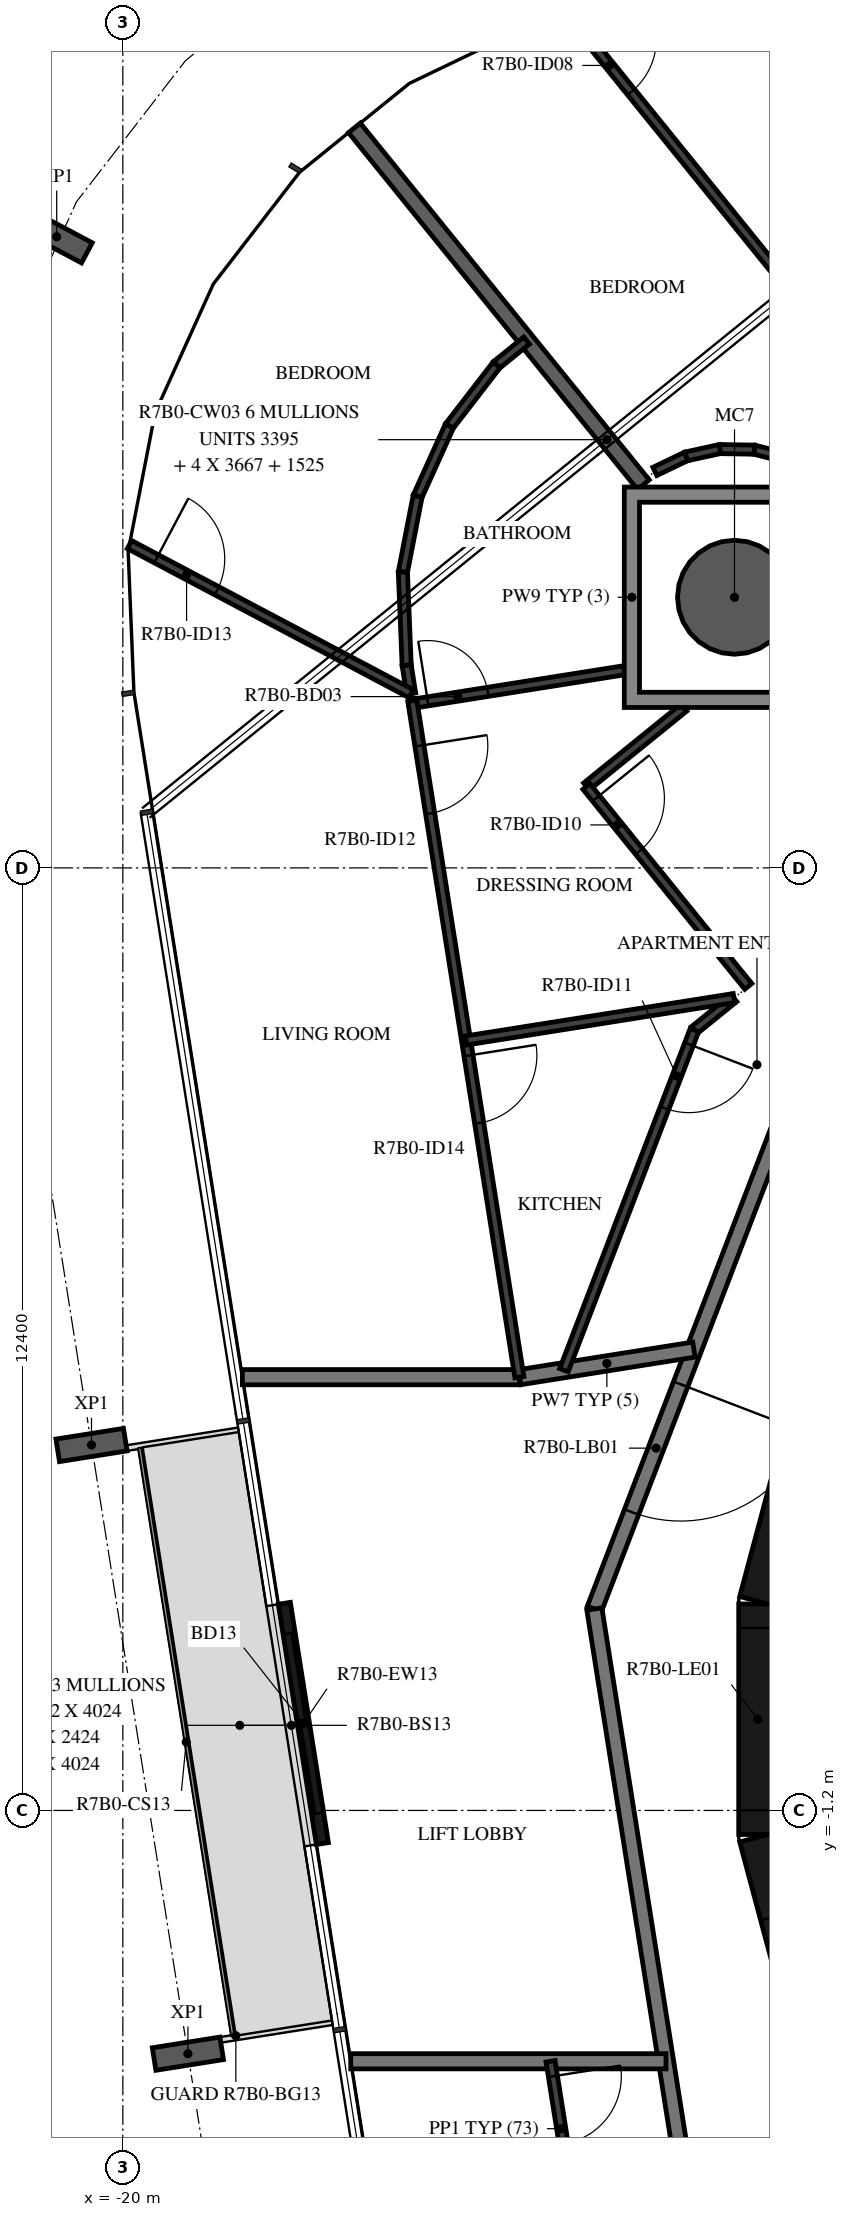
"""IFC4 building model, lengths in metres.
Left out: names, types, materials, properties, quantities, classifications, styles, units other than length and angle.
Written with IfcOpenShell. Run it as: python <this file> out.ifc"""

import sys

from ifc_helpers import new_model, si_unit, direction, frame, frame_2d, origin, origin_2d, place, context, subcontext, project, spatial, polyline, rectangle, hollow_circle, i_section, outline, extrude, element, fill, save


model = new_model("IFC4")
c1 = context("Model", 3, precision=1e-05, world=origin(), true_north=direction((0.0, 1.0)))
c2 = subcontext(c1, "Body", "Model", "MODEL_VIEW")
j1 = project(units=[si_unit("LENGTHUNIT", "METRE"), si_unit("PLANEANGLEUNIT", "RADIAN")], contexts=[c1])
p1 = place(None, origin())
s1 = spatial("IfcSite", under=j1, at=p1, CompositionType="ELEMENT")
p2 = place(p1, origin())
s2 = spatial("IfcBuilding", under=s1, at=p2, CompositionType="ELEMENT")
p3 = place(p2, frame((0.0, 0.0, 277.4)))
s3 = spatial("IfcBuildingStorey", under=s2, at=p3, CompositionType="ELEMENT", Elevation=277.4)
p4 = place(p3, frame((-11.953, 14.76, -0.38), z_axis=(0.0, 0.0, 1.0), x_axis=(1.0, 0.0, 0.0)))
e1 = element("IfcColumn", 1, at=p4, inside=s3, PredefinedType="COLUMN", context=c2, shape_type="SweptSolid", body=[
    extrude(hollow_circle(Radius=0.75, WallThickness=0.035, at=origin_2d()), origin(), (0.0, 0.0, 1.0), 3.5),
])
for number, where, z_axis, x_axis in (
    (2, (-20.87, 19.503, -0.38), (0.0, 0.0, 1.0), (0.47, 0.883, 0.0)),
    (3, (-20.412, 3.608, -0.38), (0.0, 0.0, 1.0), (-0.156, 0.988, 0.0)),
    (4, (-19.144, -4.4, -0.38), (0.0, 0.0, 1.0), (-0.156, 0.988, 0.0)),
):
    element("IfcColumn", number, at=place(p3, frame(where, z_axis=z_axis, x_axis=x_axis)), inside=s3, PredefinedType="COLUMN", context=c2, shape_type="SweptSolid", body=[
        extrude(i_section(OverallWidth=0.3, OverallDepth=0.9, WebThickness=0.019, FlangeThickness=0.035, FilletRadius=0.03, at=origin_2d()), origin(), (0.0, 0.0, 1.0), 3.5),
    ])
p5 = place(p3, frame((-17.875, 1.525, 0.0), z_axis=(0.0, 0.0, 1.0), x_axis=(0.156413134305, -0.987691718816, 0.0)))
e5 = element("IfcWall", 5, at=p5, inside=s3, PredefinedType="STANDARD", context=c2, shape_type="SweptSolid", body=[
    extrude(rectangle(XDim=3.2, YDim=0.16, at=frame_2d((1.6, 0.0))), origin(), (0.0, 0.0, 1.0), 3.12),
])
p6 = place(p5, frame((0.4, 0.0, 0.0)))
e6 = element("IfcOpeningElement", 6, at=p6, cuts=e5, PredefinedType="OPENING", context=c2, shape_type="SweptSolid", body=[
    extrude(rectangle(XDim=2.4, YDim=2.4, at=frame_2d((1.2, 1.2))), frame((0.0, 0.09, 0.0), z_axis=(0.0, -1.0, 0.0), x_axis=(1.0, 0.0, 0.0)), (0.0, 0.0, 1.0), 0.18),
])
p7 = place(p3, frame((-10.858, 4.479, 0.0), z_axis=(0.0, 0.0, 1.0), x_axis=(-0.258734743916, -0.965948410781, 0.0)))
e7 = element("IfcWall", 7, at=p7, inside=s3, PredefinedType="SHEAR", context=c2, shape_type="SweptSolid", body=[
    extrude(rectangle(XDim=3.033, YDim=0.5, at=frame_2d((1.516, 0.0))), origin(), (0.0, 0.0, 1.0), 3.12),
])
p8 = place(p3, frame((-11.647, 1.516, 0.0), z_axis=(0.0, 0.0, 1.0), x_axis=(0.0, -1.0, 0.0)))
e8 = element("IfcWall", 8, at=p8, inside=s3, PredefinedType="SHEAR", context=c2, shape_type="SweptSolid", body=[
    extrude(rectangle(XDim=3.033, YDim=0.5, at=frame_2d((1.516, 0.0))), origin(), (0.0, 0.0, 1.0), 3.12),
])
p9 = place(p8, frame((0.316, 0.0, 0.0)))
e9 = element("IfcOpeningElement", 9, at=p9, cuts=e8, PredefinedType="OPENING", context=c2, shape_type="SweptSolid", body=[
    extrude(rectangle(XDim=2.4, YDim=2.1, at=frame_2d((1.2, 1.05))), frame((0.0, 0.26, 0.0), z_axis=(0.0, -1.0, 0.0), x_axis=(1.0, 0.0, 0.0)), (0.0, 0.0, 1.0), 0.52),
])
p10 = place(p3, frame((-11.643, -1.55, 0.0), z_axis=(0.0, 0.0, 1.0), x_axis=(0.258734743916, -0.965948410781, 0.0)))
e10 = element("IfcWall", 10, at=p10, inside=s3, PredefinedType="SHEAR", context=c2, shape_type="SweptSolid", body=[
    extrude(rectangle(XDim=3.033, YDim=0.5, at=frame_2d((1.516, 0.0))), origin(), (0.0, 0.0, 1.0), 3.12),
])
p11 = place(p10, frame((1.066, 0.0, 0.0)))
e11 = element("IfcOpeningElement", 11, at=p11, cuts=e10, PredefinedType="OPENING", context=c2, shape_type="SweptSolid", body=[
    extrude(rectangle(XDim=0.9, YDim=2.1, at=frame_2d((0.45, 1.05))), frame((0.0, 0.26, 0.0), z_axis=(0.0, -1.0, 0.0), x_axis=(1.0, 0.0, 0.0)), (0.0, 0.0, 1.0), 0.52),
])
p12 = place(p3, frame((-11.223, 8.154, 0.0), z_axis=(0.0, 0.0, 1.0), x_axis=(-0.358341090983, -0.93359073609, 0.0)))
e12 = element("IfcWall", 12, at=p12, inside=s3, PredefinedType="STANDARD", context=c2, shape_type="SweptSolid", body=[
    extrude(rectangle(XDim=7.181, YDim=0.2, at=frame_2d((3.59, 0.0))), origin(), (0.0, 0.0, 1.0), 3.12),
])
p13 = place(p12, frame((4.014, 0.0, 0.0)))
e13 = element("IfcOpeningElement", 13, at=p13, cuts=e12, PredefinedType="OPENING", context=c2, shape_type="SweptSolid", body=[
    extrude(rectangle(XDim=1.8, YDim=2.1, at=frame_2d((0.9, 1.05))), frame((0.0, 0.11, 0.0), z_axis=(0.0, -1.0, 0.0), x_axis=(1.0, 0.0, 0.0)), (0.0, 0.0, 1.0), 0.22),
])
p14 = place(p3, frame((-13.797, 1.45, 0.0), z_axis=(0.0, 0.0, 1.0), x_axis=(0.156421704315, -0.987690361611, 0.0)))
e14 = element("IfcWall", 14, at=p14, inside=s3, PredefinedType="STANDARD", context=c2, shape_type="SweptSolid", body=[
    extrude(rectangle(XDim=7.181, YDim=0.2, at=frame_2d((3.591, 0.0))), origin(), (0.0, 0.0, 1.0), 3.12),
])
p15 = place(p3, frame((-12.487, 4.863, 0.0), z_axis=(0.0, 0.0, 1.0), x_axis=(-0.98769031179, -0.156422018898, 0.0)))
e15 = element("IfcWall", 15, at=p15, inside=s3, PredefinedType="STANDARD", context=c2, shape_type="SweptSolid", body=[
    extrude(rectangle(XDim=2.319, YDim=0.2, at=frame_2d((1.16, 0.0))), origin(), (0.0, 0.0, 1.0), 3.12),
])
p16 = place(p3, frame((-14.783, 4.5, 0.0), z_axis=(0.0, 0.0, 1.0), x_axis=(-1.0, 0.0, 0.0)))
e16 = element("IfcWall", 16, at=p16, inside=s3, PredefinedType="STANDARD", context=c2, shape_type="SweptSolid", body=[
    extrude(rectangle(XDim=3.645, YDim=0.2, at=frame_2d((1.822, 0.0))), origin(), (0.0, 0.0, 1.0), 3.12),
])
p17 = place(p3, frame((-17.002, -4.5, 0.0), z_axis=(0.0, 0.0, 1.0), x_axis=(1.0, 0.0, 0.0)))
e17 = element("IfcWall", 17, at=p17, inside=s3, PredefinedType="STANDARD", context=c2, shape_type="SweptSolid", body=[
    extrude(rectangle(XDim=4.148, YDim=0.2, at=frame_2d((2.074, 0.0))), origin(), (0.0, 0.0, 1.0), 3.12),
])
p18 = place(p3, frame((-16.953, 20.936, 0.0), z_axis=(0.0, 0.0, 1.0), x_axis=(0.629347053134, -0.77712437017, 0.0)))
e18 = element("IfcWall", 18, at=p18, inside=s3, PredefinedType="STANDARD", context=c2, shape_type="SweptSolid", body=[
    extrude(rectangle(XDim=6.04, YDim=0.2, at=frame_2d((3.02, 0.0))), origin(), (0.0, 0.0, 1.0), 3.12),
])
p19 = place(p3, frame((-14.132, 22.418, 0.0), z_axis=(0.0, 0.0, 1.0), x_axis=(0.629309172704, -0.77715504576, 0.0)))
e19 = element("IfcWall", 19, at=p19, inside=s3, PredefinedType="PARTITIONING", context=c2, shape_type="SweptSolid", body=[
    extrude(rectangle(XDim=8.736, YDim=0.12, at=frame_2d((4.368, 0.0))), origin(), (0.0, 0.0, 1.0), 3.12),
])
p20 = place(p19, frame((0.4, 0.0, 0.0)))
e20 = element("IfcOpeningElement", 20, at=p20, cuts=e19, PredefinedType="OPENING", context=c2, shape_type="SweptSolid", body=[
    extrude(rectangle(XDim=0.9, YDim=2.1, at=frame_2d((0.45, 1.05))), frame((0.0, 0.07, 0.0), z_axis=(0.0, -1.0, 0.0), x_axis=(1.0, 0.0, 0.0)), (0.0, 0.0, 1.0), 0.14),
])
p21 = place(p3, frame((-10.91, 16.502, 0.0), z_axis=(0.0, 0.0, 1.0), x_axis=(-0.96886520615, 0.247588796823, 0.0)))
e21 = element("IfcWall", 21, at=p21, inside=s3, PredefinedType="PARTITIONING", context=c2, shape_type="SweptSolid", body=[
    extrude(rectangle(XDim=0.807, YDim=0.12, at=frame_2d((0.403, 0.0))), origin(), (0.0, 0.0, 1.0), 3.12),
])
p22 = place(p3, frame((-11.691, 16.702, 0.0), z_axis=(0.0, 0.0, 1.0), x_axis=(-0.999843155249, 0.017710587291, 0.0)))
e22 = element("IfcWall", 22, at=p22, inside=s3, PredefinedType="PARTITIONING", context=c2, shape_type="SweptSolid", body=[
    extrude(rectangle(XDim=0.455, YDim=0.12, at=frame_2d((0.228, 0.0))), origin(), (0.0, 0.0, 1.0), 3.12),
])
p23 = place(p3, frame((-12.146, 16.71, 0.0), z_axis=(0.0, 0.0, 1.0), x_axis=(-0.976826470165, -0.21403281801, 0.0)))
e23 = element("IfcWall", 23, at=p23, inside=s3, PredefinedType="PARTITIONING", context=c2, shape_type="SweptSolid", body=[
    extrude(rectangle(XDim=0.455, YDim=0.12, at=frame_2d((0.228, 0.0))), origin(), (0.0, 0.0, 1.0), 3.12),
])
p24 = place(p3, frame((-12.591, 16.613, 0.0), z_axis=(0.0, 0.0, 1.0), x_axis=(-0.901405666701, -0.432975546699, 0.0)))
e24 = element("IfcWall", 24, at=p24, inside=s3, PredefinedType="PARTITIONING", context=c2, shape_type="SweptSolid", body=[
    extrude(rectangle(XDim=0.455, YDim=0.12, at=frame_2d((0.227, 0.0))), origin(), (0.0, 0.0, 1.0), 3.12),
])
p25 = place(p3, frame((-12.616, 13.311, 0.0), z_axis=(0.0, 0.0, 1.0), x_axis=(-0.7771657422, -0.629295963082, 0.0)))
e25 = element("IfcWall", 25, at=p25, inside=s3, PredefinedType="PARTITIONING", context=c2, shape_type="SweptSolid", body=[
    extrude(rectangle(XDim=1.653, YDim=0.12, at=frame_2d((0.826, 0.0))), origin(), (0.0, 0.0, 1.0), 3.12),
])
p26 = place(p3, frame((-13.901, 12.271, 0.0), z_axis=(0.0, 0.0, 1.0), x_axis=(0.62932066967, -0.777145735835, 0.0)))
e26 = element("IfcWall", 26, at=p26, inside=s3, PredefinedType="PARTITIONING", context=c2, shape_type="SweptSolid", body=[
    extrude(rectangle(XDim=3.384, YDim=0.12, at=frame_2d((1.692, 0.0))), origin(), (0.0, 0.0, 1.0), 3.12),
])
p27 = place(p26, frame((0.2, 0.0, 0.0)))
e27 = element("IfcOpeningElement", 27, at=p27, cuts=e26, PredefinedType="OPENING", context=c2, shape_type="SweptSolid", body=[
    extrude(rectangle(XDim=0.9, YDim=2.1, at=frame_2d((0.45, 1.05))), frame((0.0, 0.07, 0.0), z_axis=(0.0, -1.0, 0.0), x_axis=(1.0, 0.0, 0.0)), (0.0, 0.0, 1.0), 0.14),
])
p28 = place(p3, frame((-11.96, 9.487, 0.0), z_axis=(0.0, 0.0, 1.0), x_axis=(-0.777219341678, -0.62922976322, 0.0)))
e28 = element("IfcWall", 28, at=p28, inside=s3, PredefinedType="PARTITIONING", context=c2, shape_type="SweptSolid", body=[
    extrude(rectangle(XDim=0.668, YDim=0.12, at=frame_2d((0.334, 0.0))), origin(), (0.0, 0.0, 1.0), 3.12),
])
p29 = place(p3, frame((-12.479, 9.067, 0.0), z_axis=(0.0, 0.0, 1.0), x_axis=(-0.358402229057, -0.933567267104, 0.0)))
e29 = element("IfcWall", 29, at=p29, inside=s3, PredefinedType="PARTITIONING", context=c2, shape_type="SweptSolid", body=[
    extrude(rectangle(XDim=4.793, YDim=0.12, at=frame_2d((2.397, 0.0))), origin(), (0.0, 0.0, 1.0), 3.12),
])
p30 = place(p29, frame((0.2, 0.0, 0.0)))
e30 = element("IfcOpeningElement", 30, at=p30, cuts=e29, PredefinedType="OPENING", context=c2, shape_type="SweptSolid", body=[
    extrude(rectangle(XDim=0.9, YDim=2.1, at=frame_2d((0.45, 1.05))), frame((0.0, 0.07, 0.0), z_axis=(0.0, -1.0, 0.0), x_axis=(1.0, 0.0, 0.0)), (0.0, 0.0, 1.0), 0.14),
])
p31 = place(p3, frame((-14.688, 18.138, 0.0), z_axis=(0.0, 0.0, 1.0), x_axis=(-0.777009819755, -0.629488474879, 0.0)))
e31 = element("IfcWall", 31, at=p31, inside=s3, PredefinedType="PARTITIONING", context=c2, shape_type="SweptSolid", body=[
    extrude(rectangle(XDim=0.508, YDim=0.12, at=frame_2d((0.254, 0.0))), origin(), (0.0, 0.0, 1.0), 3.12),
])
p32 = place(p3, frame((-15.083, 17.818, 0.0), z_axis=(0.0, 0.0, 1.0), x_axis=(-0.611091802574, -0.791559731686, 0.0)))
e32 = element("IfcWall", 32, at=p32, inside=s3, PredefinedType="PARTITIONING", context=c2, shape_type="SweptSolid", body=[
    extrude(rectangle(XDim=1.016, YDim=0.12, at=frame_2d((0.508, 0.0))), origin(), (0.0, 0.0, 1.0), 3.12),
])
p33 = place(p3, frame((-15.703, 17.014, 0.0), z_axis=(0.0, 0.0, 1.0), x_axis=(-0.411973085874, -0.911196014322, 0.0)))
e33 = element("IfcWall", 33, at=p33, inside=s3, PredefinedType="PARTITIONING", context=c2, shape_type="SweptSolid", body=[
    extrude(rectangle(XDim=1.016, YDim=0.12, at=frame_2d((0.508, 0.0))), origin(), (0.0, 0.0, 1.0), 3.12),
])
p34 = place(p3, frame((-16.122, 16.088, 0.0), z_axis=(0.0, 0.0, 1.0), x_axis=(-0.191030445301, -0.981584112019, 0.0)))
e34 = element("IfcWall", 34, at=p34, inside=s3, PredefinedType="PARTITIONING", context=c2, shape_type="SweptSolid", body=[
    extrude(rectangle(XDim=1.016, YDim=0.12, at=frame_2d((0.508, 0.0))), origin(), (0.0, 0.0, 1.0), 3.12),
])
p35 = place(p3, frame((-16.316, 15.091, 0.0), z_axis=(0.0, 0.0, 1.0), x_axis=(0.040786423131, -0.999167887639, 0.0)))
e35 = element("IfcWall", 35, at=p35, inside=s3, PredefinedType="PARTITIONING", context=c2, shape_type="SweptSolid", body=[
    extrude(rectangle(XDim=1.227, YDim=0.12, at=frame_2d((0.614, 0.0))), origin(), (0.0, 0.0, 1.0), 3.12),
])
p36 = place(p3, frame((-16.266, 13.865, 0.0), z_axis=(0.0, 0.0, 1.0), x_axis=(0.156757556272, -0.987637113798, 0.0)))
e36 = element("IfcWall", 36, at=p36, inside=s3, PredefinedType="PARTITIONING", context=c2, shape_type="SweptSolid", body=[
    extrude(rectangle(XDim=0.378, YDim=0.12, at=frame_2d((0.189, 0.0))), origin(), (0.0, 0.0, 1.0), 3.12),
])
p37 = place(p3, frame((-16.186, 13.359, 0.0), z_axis=(0.0, 0.0, 1.0), x_axis=(0.987680631298, 0.156483131865, 0.0)))
e37 = element("IfcWall", 37, at=p37, inside=s3, PredefinedType="PARTITIONING", context=c2, shape_type="SweptSolid", body=[
    extrude(rectangle(XDim=2.818, YDim=0.12, at=frame_2d((1.409, 0.0))), origin(), (0.0, 0.0, 1.0), 3.12),
])
p38 = place(p37, frame((0.2, 0.0, 0.0)))
e38 = element("IfcOpeningElement", 38, at=p38, cuts=e37, PredefinedType="OPENING", context=c2, shape_type="SweptSolid", body=[
    extrude(rectangle(XDim=0.8, YDim=2.1, at=frame_2d((0.4, 1.05))), frame((0.0, 0.07, 0.0), z_axis=(0.0, -1.0, 0.0), x_axis=(1.0, 0.0, 0.0)), (0.0, 0.0, 1.0), 0.14),
])
p39 = place(p3, frame((-19.913, 15.454, 0.0), z_axis=(0.0, 0.0, 1.0), x_axis=(0.883751094582, -0.467957266024, 0.0)))
e39 = element("IfcWall", 39, at=p39, inside=s3, PredefinedType="PARTITIONING", context=c2, shape_type="SweptSolid", body=[
    extrude(rectangle(XDim=4.194, YDim=0.12, at=frame_2d((2.097, 0.0))), origin(), (0.0, 0.0, 1.0), 3.12),
])
p40 = place(p39, frame((0.4, 0.0, 0.0)))
e40 = element("IfcOpeningElement", 40, at=p40, cuts=e39, PredefinedType="OPENING", context=c2, shape_type="SweptSolid", body=[
    extrude(rectangle(XDim=0.9, YDim=2.1, at=frame_2d((0.45, 1.05))), frame((0.0, 0.07, 0.0), z_axis=(0.0, -1.0, 0.0), x_axis=(1.0, 0.0, 0.0)), (0.0, 0.0, 1.0), 0.14),
])
p41 = place(p3, frame((-16.192, 13.399, 0.0), z_axis=(0.0, 0.0, 1.0), x_axis=(0.156405047803, -0.987692999379, 0.0)))
e41 = element("IfcWall", 41, at=p41, inside=s3, PredefinedType="PARTITIONING", context=c2, shape_type="SweptSolid", body=[
    extrude(rectangle(XDim=9.01, YDim=0.12, at=frame_2d((4.505, 0.0))), origin(), (0.0, 0.0, 1.0), 3.12),
])
p42 = place(p41, frame((0.6, 0.0, 0.0)))
e42 = element("IfcOpeningElement", 42, at=p42, cuts=e41, PredefinedType="OPENING", context=c2, shape_type="SweptSolid", body=[
    extrude(rectangle(XDim=0.9, YDim=2.1, at=frame_2d((0.45, 1.05))), frame((0.0, 0.07, 0.0), z_axis=(0.0, -1.0, 0.0), x_axis=(1.0, 0.0, 0.0)), (0.0, 0.0, 1.0), 0.14),
])
p43 = place(p41, frame((4.725, 0.0, 0.0)))
e43 = element("IfcOpeningElement", 43, at=p43, cuts=e41, PredefinedType="OPENING", context=c2, shape_type="SweptSolid", body=[
    extrude(rectangle(XDim=0.9, YDim=2.1, at=frame_2d((0.45, 1.05))), frame((0.0, 0.07, 0.0), z_axis=(0.0, -1.0, 0.0), x_axis=(1.0, 0.0, 0.0)), (0.0, 0.0, 1.0), 0.14),
])
p44 = place(p3, frame((-15.484, 8.929, 0.0), z_axis=(0.0, 0.0, 1.0), x_axis=(0.987689619983, 0.156426387092, 0.0)))
e44 = element("IfcWall", 44, at=p44, inside=s3, PredefinedType="PARTITIONING", context=c2, shape_type="SweptSolid", body=[
    extrude(rectangle(XDim=3.568, YDim=0.12, at=frame_2d((1.784, 0.0))), origin(), (0.0, 0.0, 1.0), 3.12),
])
p45 = place(p3, frame((-14.373, -4.5, 0.0), z_axis=(0.0, 0.0, 1.0), x_axis=(0.156437152886, -0.987687914878, 0.0)))
e45 = element("IfcWall", 45, at=p45, inside=s3, PredefinedType="PARTITIONING", context=c2, shape_type="SweptSolid", body=[
    extrude(rectangle(XDim=1.796, YDim=0.12, at=frame_2d((0.898, 0.0))), origin(), (0.0, 0.0, 1.0), 3.12),
])
p46 = place(p45, frame((0.2, 0.0, 0.0)))
e46 = element("IfcOpeningElement", 46, at=p46, cuts=e45, PredefinedType="OPENING", context=c2, shape_type="SweptSolid", body=[
    extrude(rectangle(XDim=0.9, YDim=2.1, at=frame_2d((0.45, 1.05))), frame((0.0, 0.07, 0.0), z_axis=(0.0, -1.0, 0.0), x_axis=(1.0, 0.0, 0.0)), (0.0, 0.0, 1.0), 0.14),
])
p47 = place(p3, origin())
e47 = element("IfcWall", 47, at=p47, inside=s3, PredefinedType="STANDARD", context=c2, shape_type="SweptSolid", body=[
    extrude(outline(polyline([(-10.503, 16.21), (-10.503, 13.311), (-13.403, 13.311), (-13.403, 16.21), (-10.503, 16.21)]), holes=[polyline([(-13.203, 13.51), (-10.703, 13.51), (-10.703, 16.01), (-13.203, 16.01), (-13.203, 13.51)])]), origin(), (0.0, 0.0, 1.0), 3.12),
])
p48 = place(p6, origin())
e48 = element("IfcDoor", 48, at=p48, inside=s3, OperationType="DOUBLE_DOOR_SLIDING", PredefinedType="DOOR", context=c2, shape_type="SweptSolid", body=[
    extrude(rectangle(XDim=2.4, YDim=2.4, at=frame_2d((1.2, 1.2))), frame((0.0, 0.025, 0.0), z_axis=(0.0, -1.0, 0.0), x_axis=(1.0, 0.0, 0.0)), (0.0, 0.0, 1.0), 0.05),
])
fill(e6, e48)
p49 = place(p9, origin())
e49 = element("IfcDoor", 49, at=p49, inside=s3, OperationType="DOUBLE_DOOR_SINGLE_SWING", PredefinedType="DOOR", context=c2, shape_type="SweptSolid", body=[
    extrude(rectangle(XDim=2.4, YDim=2.1, at=frame_2d((1.2, 1.05))), frame((0.0, 0.025, 0.0), z_axis=(0.0, -1.0, 0.0), x_axis=(1.0, 0.0, 0.0)), (0.0, 0.0, 1.0), 0.05),
])
fill(e9, e49)
p50 = place(p20, origin())
e50 = element("IfcDoor", 50, at=p50, inside=s3, OperationType="SINGLE_SWING_RIGHT", PredefinedType="DOOR", context=c2, shape_type="SweptSolid", body=[
    extrude(rectangle(XDim=0.9, YDim=2.1, at=frame_2d((0.45, 1.05))), frame((0.0, 0.025, 0.0), z_axis=(0.0, -1.0, 0.0), x_axis=(1.0, 0.0, 0.0)), (0.0, 0.0, 1.0), 0.05),
])
fill(e20, e50)
p51 = place(p27, origin())
e51 = element("IfcDoor", 51, at=p51, inside=s3, OperationType="SINGLE_SWING_LEFT", PredefinedType="DOOR", context=c2, shape_type="SweptSolid", body=[
    extrude(rectangle(XDim=0.9, YDim=2.1, at=frame_2d((0.45, 1.05))), frame((0.0, 0.025, 0.0), z_axis=(0.0, -1.0, 0.0), x_axis=(1.0, 0.0, 0.0)), (0.0, 0.0, 1.0), 0.05),
])
fill(e27, e51)
p52 = place(p30, origin())
e52 = element("IfcDoor", 52, at=p52, inside=s3, OperationType="SINGLE_SWING_LEFT", PredefinedType="DOOR", context=c2, shape_type="SweptSolid", body=[
    extrude(rectangle(XDim=0.9, YDim=2.1, at=frame_2d((0.45, 1.05))), frame((0.0, 0.025, 0.0), z_axis=(0.0, -1.0, 0.0), x_axis=(1.0, 0.0, 0.0)), (0.0, 0.0, 1.0), 0.05),
])
fill(e30, e52)
p53 = place(p38, origin())
e53 = element("IfcDoor", 53, at=p53, inside=s3, OperationType="SINGLE_SWING_LEFT", PredefinedType="DOOR", context=c2, shape_type="SweptSolid", body=[
    extrude(rectangle(XDim=0.8, YDim=2.1, at=frame_2d((0.4, 1.05))), frame((0.0, 0.025, 0.0), z_axis=(0.0, -1.0, 0.0), x_axis=(1.0, 0.0, 0.0)), (0.0, 0.0, 1.0), 0.05),
])
fill(e38, e53)
p54 = place(p42, origin())
e54 = element("IfcDoor", 54, at=p54, inside=s3, OperationType="SINGLE_SWING_LEFT", PredefinedType="DOOR", context=c2, shape_type="SweptSolid", body=[
    extrude(rectangle(XDim=0.9, YDim=2.1, at=frame_2d((0.45, 1.05))), frame((0.0, 0.025, 0.0), z_axis=(0.0, -1.0, 0.0), x_axis=(1.0, 0.0, 0.0)), (0.0, 0.0, 1.0), 0.05),
])
fill(e42, e54)
p55 = place(p40, origin())
e55 = element("IfcDoor", 55, at=p55, inside=s3, OperationType="SINGLE_SWING_LEFT", PredefinedType="DOOR", context=c2, shape_type="SweptSolid", body=[
    extrude(rectangle(XDim=0.9, YDim=2.1, at=frame_2d((0.45, 1.05))), frame((0.0, 0.025, 0.0), z_axis=(0.0, -1.0, 0.0), x_axis=(1.0, 0.0, 0.0)), (0.0, 0.0, 1.0), 0.05),
])
fill(e40, e55)
p56 = place(p43, origin())
e56 = element("IfcDoor", 56, at=p56, inside=s3, OperationType="SINGLE_SWING_RIGHT", PredefinedType="DOOR", context=c2, shape_type="SweptSolid", body=[
    extrude(rectangle(XDim=0.9, YDim=2.1, at=frame_2d((0.45, 1.05))), frame((0.0, 0.025, 0.0), z_axis=(0.0, -1.0, 0.0), x_axis=(1.0, 0.0, 0.0)), (0.0, 0.0, 1.0), 0.05),
])
fill(e43, e56)
p57 = place(p46, origin())
e57 = element("IfcDoor", 57, at=p57, inside=s3, OperationType="SINGLE_SWING_RIGHT", PredefinedType="DOOR", context=c2, shape_type="SweptSolid", body=[
    extrude(rectangle(XDim=0.9, YDim=2.1, at=frame_2d((0.45, 1.05))), frame((0.0, 0.025, 0.0), z_axis=(0.0, -1.0, 0.0), x_axis=(1.0, 0.0, 0.0)), (0.0, 0.0, 1.0), 0.05),
])
fill(e46, e57)
p58 = place(p13, origin())
e58 = element("IfcDoor", 58, at=p58, inside=s3, OperationType="DOUBLE_DOOR_SINGLE_SWING", PredefinedType="DOOR", context=c2, shape_type="SweptSolid", body=[
    extrude(rectangle(XDim=1.8, YDim=2.1, at=frame_2d((0.9, 1.05))), frame((0.0, 0.025, 0.0), z_axis=(0.0, -1.0, 0.0), x_axis=(1.0, 0.0, 0.0)), (0.0, 0.0, 1.0), 0.05),
])
fill(e13, e58)
save(model, sys.argv[1])
